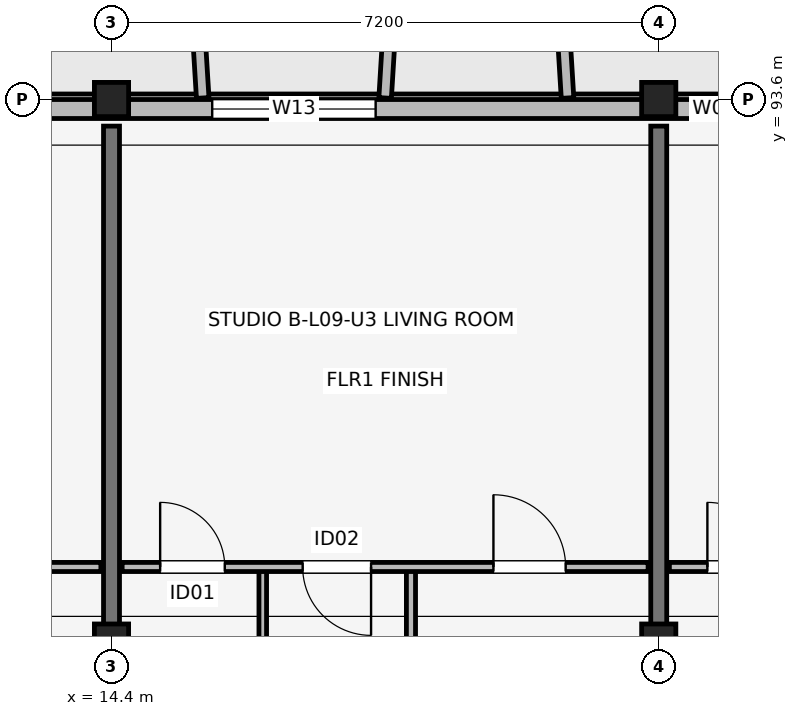
"""IFC4 building model, lengths in metres.
Left out: names, types, materials, properties, quantities, classifications, styles, units other than length and angle.
Written with IfcOpenShell. Run it as: python <this file> out.ifc"""

import sys

from ifc_helpers import new_model, si_unit, direction, frame, frame_2d, origin, origin_2d, place, context, subcontext, project, spatial, rectangle, extrude, element, fill, save


model = new_model("IFC4")
c1 = context("Model", 3, precision=1e-05, world=origin(), true_north=direction((0.0, 1.0)))
c2 = subcontext(c1, "Body", "Model", "MODEL_VIEW")
j1 = project(units=[si_unit("LENGTHUNIT", "METRE"), si_unit("PLANEANGLEUNIT", "RADIAN")], contexts=[c1])
p1 = place(None, origin())
s1 = spatial("IfcSite", under=j1, at=p1, CompositionType="ELEMENT")
p2 = place(p1, origin())
s2 = spatial("IfcBuilding", under=s1, at=p2, CompositionType="ELEMENT")
p3 = place(p2, frame((0.0, 0.0, 30.75)))
s3 = spatial("IfcBuildingStorey", under=s2, at=p3, CompositionType="ELEMENT", Elevation=30.75)
p4 = place(p3, frame((14.4, 86.4, 0.0), z_axis=(0.0, 0.0, 1.0), x_axis=(1.0, 0.0, 0.0)))
e1 = element("IfcColumn", 1, at=p4, inside=s3, PredefinedType="COLUMN", context=c2, shape_type="SweptSolid", body=[
    extrude(rectangle(XDim=0.45, YDim=0.6, at=origin_2d()), origin(), (0.0, 0.0, 1.0), 3.15),
])
p5 = place(p3, frame((14.4, 93.6, 0.0), z_axis=(0.0, 0.0, 1.0), x_axis=(1.0, 0.0, 0.0)))
e2 = element("IfcColumn", 2, at=p5, inside=s3, PredefinedType="COLUMN", context=c2, shape_type="SweptSolid", body=[
    extrude(rectangle(XDim=0.45, YDim=0.45, at=origin_2d()), origin(), (0.0, 0.0, 1.0), 3.15),
])
p6 = place(p3, frame((21.6, 86.4, 0.0), z_axis=(0.0, 0.0, 1.0), x_axis=(1.0, 0.0, 0.0)))
e3 = element("IfcColumn", 3, at=p6, inside=s3, PredefinedType="COLUMN", context=c2, shape_type="SweptSolid", body=[
    extrude(rectangle(XDim=0.45, YDim=0.6, at=origin_2d()), origin(), (0.0, 0.0, 1.0), 3.15),
])
p7 = place(p3, frame((21.6, 93.6, 0.0), z_axis=(0.0, 0.0, 1.0), x_axis=(1.0, 0.0, 0.0)))
e4 = element("IfcColumn", 4, at=p7, inside=s3, PredefinedType="COLUMN", context=c2, shape_type="SweptSolid", body=[
    extrude(rectangle(XDim=0.45, YDim=0.45, at=origin_2d()), origin(), (0.0, 0.0, 1.0), 3.15),
])
for number, where, z_axis, x_axis in (
    (5, (14.4, 83.85, 0.0), (0.0, 0.0, 1.0), (0.0, 1.0, 0.0)),
    (6, (21.6, 83.85, 0.0), (0.0, 0.0, 1.0), (0.0, 1.0, 0.0)),
):
    element("IfcWall", number, at=place(p3, frame(where, z_axis=z_axis, x_axis=x_axis)), inside=s3, PredefinedType="SHEAR", context=c2, shape_type="SweptSolid", body=[
        extrude(rectangle(XDim=9.4, YDim=0.21, at=frame_2d((4.7, 0.0))), origin(), (0.0, 0.0, 1.0), 3.15),
    ])
p8 = place(p3, frame((32.8, 93.475, 0.0), z_axis=(0.0, 0.0, 1.0), x_axis=(-1.0, 0.0, 0.0)))
e7 = element("IfcWall", 7, at=p8, inside=s3, PredefinedType="SOLIDWALL", context=c2, shape_type="SweptSolid", body=[
    extrude(rectangle(XDim=29.6, YDim=0.25, at=frame_2d((14.8, 0.0))), origin(), (0.0, 0.0, 1.0), 2.45),
])
p9 = place(p8, frame((21.7, 0.0, 0.0), z_axis=(0.0, 0.0, 1.0), x_axis=(-1.0, 0.0, 0.0)))
e8 = element("IfcOpeningElement", 8, at=p9, cuts=e7, PredefinedType="OPENING", context=c2, shape_type="SweptSolid", body=[
    extrude(rectangle(XDim=1.8, YDim=2.15, at=frame_2d((0.9, 1.075))), frame((0.0, 0.135, 0.0), z_axis=(0.0, -1.0, 0.0), x_axis=(1.0, 0.0, 0.0)), (0.0, 0.0, 1.0), 0.27),
])
p10 = place(p8, frame((7.225, 0.0, 0.0), z_axis=(0.0, 0.0, 1.0), x_axis=(-1.0, 0.0, 0.0)))
e9 = element("IfcOpeningElement", 9, at=p10, cuts=e7, PredefinedType="OPENING", context=c2, shape_type="SweptSolid", body=[
    extrude(rectangle(XDim=1.65, YDim=2.15, at=frame_2d((0.825, 1.075))), frame((0.0, 0.135, 0.0), z_axis=(0.0, -1.0, 0.0), x_axis=(1.0, 0.0, 0.0)), (0.0, 0.0, 1.0), 0.27),
])
p11 = place(p8, frame((27.365, 0.0, 0.75)))
e10 = element("IfcOpeningElement", 10, at=p11, cuts=e7, PredefinedType="OPENING", context=c2, shape_type="SweptSolid", body=[
    extrude(rectangle(XDim=1.1, YDim=1.5, at=frame_2d((0.55, 0.75))), frame((0.0, 0.135, 0.0), z_axis=(0.0, -1.0, 0.0), x_axis=(1.0, 0.0, 0.0)), (0.0, 0.0, 1.0), 0.27),
])
p12 = place(p8, frame((14.925, 0.0, 0.69)))
e11 = element("IfcOpeningElement", 11, at=p12, cuts=e7, PredefinedType="OPENING", context=c2, shape_type="SweptSolid", body=[
    extrude(rectangle(XDim=2.15, YDim=1.65, at=frame_2d((1.075, 0.825))), frame((0.0, 0.135, 0.0), z_axis=(0.0, -1.0, 0.0), x_axis=(1.0, 0.0, 0.0)), (0.0, 0.0, 1.0), 0.27),
])
p13 = place(p8, frame((10.167, 0.0, 0.75)))
e12 = element("IfcOpeningElement", 12, at=p13, cuts=e7, PredefinedType="OPENING", context=c2, shape_type="SweptSolid", body=[
    extrude(rectangle(XDim=0.6, YDim=1.25, at=frame_2d((0.3, 0.625))), frame((0.0, 0.135, 0.0), z_axis=(0.0, -1.0, 0.0), x_axis=(1.0, 0.0, 0.0)), (0.0, 0.0, 1.0), 0.27),
])
p14 = place(p8, frame((2.968, 0.0, 0.75)))
e13 = element("IfcOpeningElement", 13, at=p14, cuts=e7, PredefinedType="OPENING", context=c2, shape_type="SweptSolid", body=[
    extrude(rectangle(XDim=0.6, YDim=1.25, at=frame_2d((0.3, 0.625))), frame((0.0, 0.135, 0.0), z_axis=(0.0, -1.0, 0.0), x_axis=(1.0, 0.0, 0.0)), (0.0, 0.0, 1.0), 0.27),
])
p15 = place(p8, frame((0.9, 0.0, 0.75)))
e14 = element("IfcOpeningElement", 14, at=p15, cuts=e7, PredefinedType="OPENING", context=c2, shape_type="SweptSolid", body=[
    extrude(rectangle(XDim=0.6, YDim=1.25, at=frame_2d((0.3, 0.625))), frame((0.0, 0.135, 0.0), z_axis=(0.0, -1.0, 0.0), x_axis=(1.0, 0.0, 0.0)), (0.0, 0.0, 1.0), 0.27),
])
for number, where, z_axis, x_axis in (
    (15, (15.6, 93.62, 0.0), (0.0, 0.0, 1.0), (-0.061, 0.998, 0.0)),
    (16, (18.0, 93.62, 0.0), (0.0, 0.0, 1.0), (0.061, 0.998, 0.0)),
    (17, (20.4, 93.62, 0.0), (0.0, 0.0, 1.0), (-0.061, 0.998, 0.0)),
):
    element("IfcWall", number, at=place(p3, frame(where, z_axis=z_axis, x_axis=x_axis)), inside=s3, PredefinedType="ELEMENTEDWALL", context=c2, shape_type="SweptSolid", body=[
        extrude(rectangle(XDim=1.964, YDim=0.165, at=frame_2d((0.982, 0.0))), origin(), (0.0, 0.0, 1.0), 2.45),
    ])
p16 = place(p3, frame((7.34, 87.45, 0.0), z_axis=(0.0, 0.0, 1.0), x_axis=(1.0, 0.0, 0.0)))
e18 = element("IfcWall", 18, at=p16, inside=s3, PredefinedType="PARTITIONING", context=c2, shape_type="SweptSolid", body=[
    extrude(rectangle(XDim=6.92, YDim=0.12, at=frame_2d((3.46, 0.0))), origin(), (0.0, 0.0, 1.0), 2.38),
])
p17 = place(p16, frame((0.625, 0.0, 0.0)))
e19 = element("IfcOpeningElement", 19, at=p17, cuts=e18, PredefinedType="OPENING", context=c2, shape_type="SweptSolid", body=[
    extrude(rectangle(XDim=0.85, YDim=2.08, at=frame_2d((0.425, 1.04))), frame((0.0, 0.07, 0.0), z_axis=(0.0, -1.0, 0.0), x_axis=(1.0, 0.0, 0.0)), (0.0, 0.0, 1.0), 0.14),
])
p18 = place(p16, frame((3.525, 0.0, 0.0), z_axis=(0.0, 0.0, 1.0), x_axis=(-1.0, 0.0, 0.0)))
e20 = element("IfcOpeningElement", 20, at=p18, cuts=e18, PredefinedType="OPENING", context=c2, shape_type="SweptSolid", body=[
    extrude(rectangle(XDim=0.9, YDim=2.08, at=frame_2d((0.45, 1.04))), frame((0.0, 0.07, 0.0), z_axis=(0.0, -1.0, 0.0), x_axis=(1.0, 0.0, 0.0)), (0.0, 0.0, 1.0), 0.14),
])
p19 = place(p16, frame((5.01, 0.0, 0.0)))
e21 = element("IfcOpeningElement", 21, at=p19, cuts=e18, PredefinedType="OPENING", context=c2, shape_type="SweptSolid", body=[
    extrude(rectangle(XDim=0.95, YDim=2.08, at=frame_2d((0.475, 1.04))), frame((0.0, 0.07, 0.0), z_axis=(0.0, -1.0, 0.0), x_axis=(1.0, 0.0, 0.0)), (0.0, 0.0, 1.0), 0.14),
])
p20 = place(p3, frame((16.39, 83.7, 0.0), z_axis=(0.0, 0.0, 1.0), x_axis=(0.0, 1.0, 0.0)))
e22 = element("IfcWall", 22, at=p20, inside=s3, PredefinedType="PARTITIONING", context=c2, shape_type="SweptSolid", body=[
    extrude(rectangle(XDim=3.75, YDim=0.1, at=frame_2d((1.875, 0.0))), origin(), (0.0, 0.0, 1.0), 2.38),
])
p21 = place(p3, frame((18.34, 83.7, 0.0), z_axis=(0.0, 0.0, 1.0), x_axis=(0.0, 1.0, 0.0)))
e23 = element("IfcWall", 23, at=p21, inside=s3, PredefinedType="PARTITIONING", context=c2, shape_type="SweptSolid", body=[
    extrude(rectangle(XDim=3.75, YDim=0.12, at=frame_2d((1.875, 0.0))), origin(), (0.0, 0.0, 1.0), 2.38),
])
p22 = place(p3, frame((14.54, 87.45, 0.0), z_axis=(0.0, 0.0, 1.0), x_axis=(1.0, 0.0, 0.0)))
e24 = element("IfcWall", 24, at=p22, inside=s3, PredefinedType="PARTITIONING", context=c2, shape_type="SweptSolid", body=[
    extrude(rectangle(XDim=6.92, YDim=0.12, at=frame_2d((3.46, 0.0))), origin(), (0.0, 0.0, 1.0), 2.38),
])
p23 = place(p22, frame((0.5, 0.0, 0.0)))
e25 = element("IfcOpeningElement", 25, at=p23, cuts=e24, PredefinedType="OPENING", context=c2, shape_type="SweptSolid", body=[
    extrude(rectangle(XDim=0.85, YDim=2.08, at=frame_2d((0.425, 1.04))), frame((0.0, 0.07, 0.0), z_axis=(0.0, -1.0, 0.0), x_axis=(1.0, 0.0, 0.0)), (0.0, 0.0, 1.0), 0.14),
])
p24 = place(p22, frame((3.275, 0.0, 0.0), z_axis=(0.0, 0.0, 1.0), x_axis=(-1.0, 0.0, 0.0)))
e26 = element("IfcOpeningElement", 26, at=p24, cuts=e24, PredefinedType="OPENING", context=c2, shape_type="SweptSolid", body=[
    extrude(rectangle(XDim=0.9, YDim=2.08, at=frame_2d((0.45, 1.04))), frame((0.0, 0.07, 0.0), z_axis=(0.0, -1.0, 0.0), x_axis=(1.0, 0.0, 0.0)), (0.0, 0.0, 1.0), 0.14),
])
p25 = place(p22, frame((4.885, 0.0, 0.0)))
e27 = element("IfcOpeningElement", 27, at=p25, cuts=e24, PredefinedType="OPENING", context=c2, shape_type="SweptSolid", body=[
    extrude(rectangle(XDim=0.95, YDim=2.08, at=frame_2d((0.475, 1.04))), frame((0.0, 0.07, 0.0), z_axis=(0.0, -1.0, 0.0), x_axis=(1.0, 0.0, 0.0)), (0.0, 0.0, 1.0), 0.14),
])
p26 = place(p3, frame((21.74, 87.45, 0.0), z_axis=(0.0, 0.0, 1.0), x_axis=(1.0, 0.0, 0.0)))
e28 = element("IfcWall", 28, at=p26, inside=s3, PredefinedType="PARTITIONING", context=c2, shape_type="SweptSolid", body=[
    extrude(rectangle(XDim=6.92, YDim=0.12, at=frame_2d((3.46, 0.0))), origin(), (0.0, 0.0, 1.0), 2.38),
])
p27 = place(p26, frame((0.5, 0.0, 0.0)))
e29 = element("IfcOpeningElement", 29, at=p27, cuts=e28, PredefinedType="OPENING", context=c2, shape_type="SweptSolid", body=[
    extrude(rectangle(XDim=0.85, YDim=2.08, at=frame_2d((0.425, 1.04))), frame((0.0, 0.07, 0.0), z_axis=(0.0, -1.0, 0.0), x_axis=(1.0, 0.0, 0.0)), (0.0, 0.0, 1.0), 0.14),
])
p28 = place(p26, frame((3.425, 0.0, 0.0), z_axis=(0.0, 0.0, 1.0), x_axis=(-1.0, 0.0, 0.0)))
e30 = element("IfcOpeningElement", 30, at=p28, cuts=e28, PredefinedType="OPENING", context=c2, shape_type="SweptSolid", body=[
    extrude(rectangle(XDim=0.9, YDim=2.08, at=frame_2d((0.45, 1.04))), frame((0.0, 0.07, 0.0), z_axis=(0.0, -1.0, 0.0), x_axis=(1.0, 0.0, 0.0)), (0.0, 0.0, 1.0), 0.14),
])
p29 = place(p26, frame((5.035, 0.0, 0.0)))
e31 = element("IfcOpeningElement", 31, at=p29, cuts=e28, PredefinedType="OPENING", context=c2, shape_type="SweptSolid", body=[
    extrude(rectangle(XDim=0.95, YDim=2.08, at=frame_2d((0.475, 1.04))), frame((0.0, 0.07, 0.0), z_axis=(0.0, -1.0, 0.0), x_axis=(1.0, 0.0, 0.0)), (0.0, 0.0, 1.0), 0.14),
])
p30 = place(p12, origin())
e32 = element("IfcWindow", 32, at=p30, inside=s3, PartitioningType="SINGLE_PANEL", PredefinedType="WINDOW", context=c2, shape_type="SweptSolid", body=[
    extrude(rectangle(XDim=2.15, YDim=1.65, at=frame_2d((1.075, 0.825))), frame((0.0, 0.03, 0.0), z_axis=(0.0, -1.0, 0.0), x_axis=(1.0, 0.0, 0.0)), (0.0, 0.0, 1.0), 0.06),
])
fill(e11, e32)
p31 = place(p13, origin())
e33 = element("IfcWindow", 33, at=p31, inside=s3, PartitioningType="SINGLE_PANEL", PredefinedType="WINDOW", context=c2, shape_type="SweptSolid", body=[
    extrude(rectangle(XDim=0.6, YDim=1.25, at=frame_2d((0.3, 0.625))), frame((0.0, 0.03, 0.0), z_axis=(0.0, -1.0, 0.0), x_axis=(1.0, 0.0, 0.0)), (0.0, 0.0, 1.0), 0.06),
])
fill(e12, e33)
p32 = place(p23, origin())
e34 = element("IfcDoor", 34, at=p32, inside=s3, OperationType="SINGLE_SWING_LEFT", PredefinedType="DOOR", context=c2, shape_type="SweptSolid", body=[
    extrude(rectangle(XDim=0.85, YDim=2.08, at=frame_2d((0.425, 1.04))), frame((0.0, 0.025, 0.0), z_axis=(0.0, -1.0, 0.0), x_axis=(1.0, 0.0, 0.0)), (0.0, 0.0, 1.0), 0.05),
])
fill(e25, e34)
p33 = place(p24, origin())
e35 = element("IfcDoor", 35, at=p33, inside=s3, OperationType="SINGLE_SWING_RIGHT", PredefinedType="DOOR", context=c2, shape_type="SweptSolid", body=[
    extrude(rectangle(XDim=0.9, YDim=2.08, at=frame_2d((0.45, 1.04))), frame((0.0, 0.025, 0.0), z_axis=(0.0, -1.0, 0.0), x_axis=(1.0, 0.0, 0.0)), (0.0, 0.0, 1.0), 0.05),
])
fill(e26, e35)
p34 = place(p25, origin())
e36 = element("IfcDoor", 36, at=p34, inside=s3, OperationType="SINGLE_SWING_LEFT", PredefinedType="DOOR", context=c2, shape_type="SweptSolid", body=[
    extrude(rectangle(XDim=0.95, YDim=2.08, at=frame_2d((0.475, 1.04))), frame((0.0, 0.025, 0.0), z_axis=(0.0, -1.0, 0.0), x_axis=(1.0, 0.0, 0.0)), (0.0, 0.0, 1.0), 0.05),
])
fill(e27, e36)
p35 = place(p27, origin())
e37 = element("IfcDoor", 37, at=p35, inside=s3, OperationType="SINGLE_SWING_LEFT", PredefinedType="DOOR", context=c2, shape_type="SweptSolid", body=[
    extrude(rectangle(XDim=0.85, YDim=2.08, at=frame_2d((0.425, 1.04))), frame((0.0, 0.025, 0.0), z_axis=(0.0, -1.0, 0.0), x_axis=(1.0, 0.0, 0.0)), (0.0, 0.0, 1.0), 0.05),
])
fill(e29, e37)
save(model, sys.argv[1])
